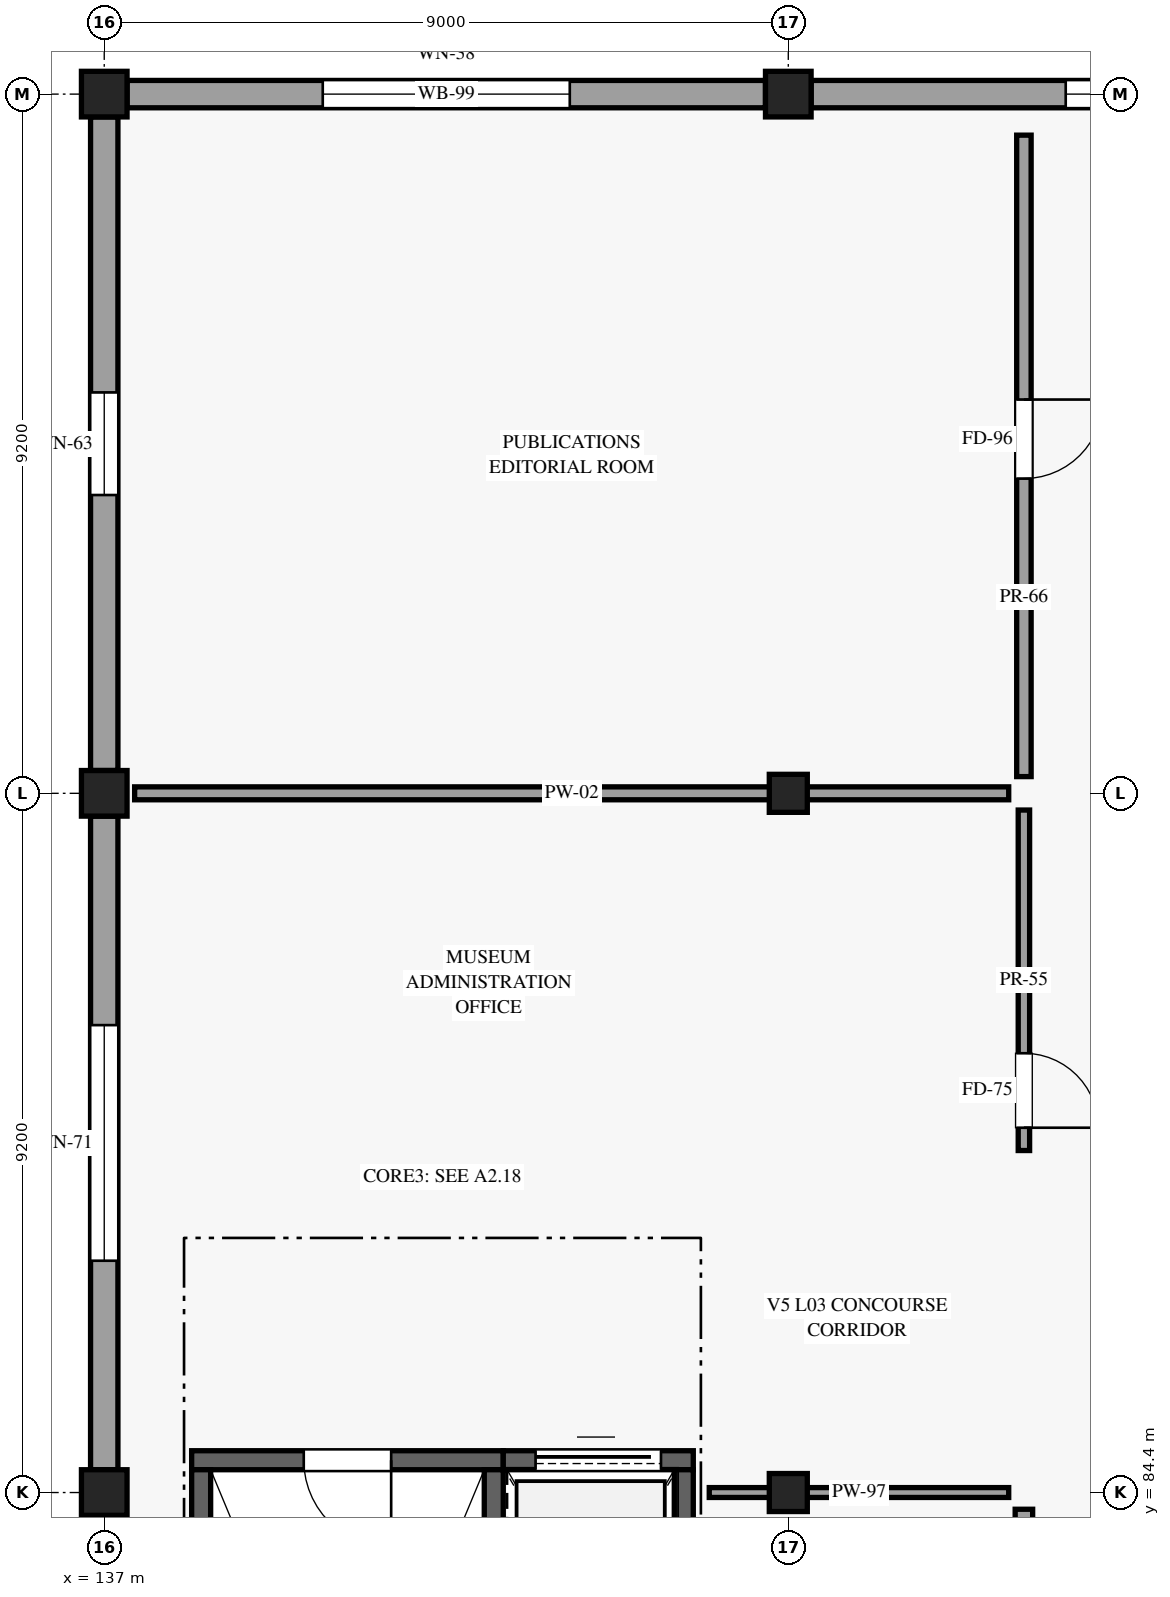
"""IFC4 building model, lengths in metres.
Left out: names, types, materials, properties, quantities, classifications, styles, units other than length and angle.
Written with IfcOpenShell. Run it as: python <this file> out.ifc"""

import sys

from ifc_helpers import new_model, si_unit, direction, frame, frame_2d, origin, origin_2d, place, context, subcontext, project, spatial, rectangle, extrude, element, fill, save


model = new_model("IFC4")
c1 = context("Model", 3, precision=1e-05, world=origin(), true_north=direction((0.0, 1.0)))
c2 = subcontext(c1, "Body", "Model", "MODEL_VIEW")
j1 = project(units=[si_unit("LENGTHUNIT", "METRE"), si_unit("PLANEANGLEUNIT", "RADIAN")], contexts=[c1])
p1 = place(None, origin())
s1 = spatial("IfcSite", under=j1, at=p1, CompositionType="ELEMENT")
p2 = place(p1, origin())
s2 = spatial("IfcBuilding", under=s1, at=p2, CompositionType="ELEMENT")
p3 = place(p2, frame((0.0, 0.0, 15.0)))
s3 = spatial("IfcBuildingStorey", under=s2, at=p3, CompositionType="ELEMENT", Elevation=15.0)
for number, where, z_axis, x_axis in (
    (1, (137.0, 84.4, 0.0), (0.0, 0.0, 1.0), (1.0, 0.0, 0.0)),
    (2, (137.0, 93.6, 0.0), (0.0, 0.0, 1.0), (1.0, 0.0, 0.0)),
    (3, (137.0, 102.8, 0.0), (0.0, 0.0, 1.0), (1.0, 0.0, 0.0)),
):
    element("IfcColumn", number, at=place(p3, frame(where, z_axis=z_axis, x_axis=x_axis)), inside=s3, PredefinedType="COLUMN", context=c2, shape_type="SweptSolid", body=[
        extrude(rectangle(XDim=0.6, YDim=0.6, at=origin_2d()), origin(), (0.0, 0.0, 1.0), 4.5),
    ])
for number, where, z_axis, x_axis in (
    (4, (146.0, 84.4, 0.0), (0.0, 0.0, 1.0), (1.0, 0.0, 0.0)),
    (5, (146.0, 93.6, 0.0), (0.0, 0.0, 1.0), (1.0, 0.0, 0.0)),
):
    element("IfcColumn", number, at=place(p3, frame(where, z_axis=z_axis, x_axis=x_axis)), inside=s3, PredefinedType="COLUMN", context=c2, shape_type="SweptSolid", body=[
        extrude(rectangle(XDim=0.5, YDim=0.5, at=origin_2d()), origin(), (0.0, 0.0, 1.0), 4.5),
    ])
p4 = place(p3, frame((146.0, 102.8, 0.0), z_axis=(0.0, 0.0, 1.0), x_axis=(1.0, 0.0, 0.0)))
e6 = element("IfcColumn", 6, at=p4, inside=s3, PredefinedType="COLUMN", context=c2, shape_type="SweptSolid", body=[
    extrude(rectangle(XDim=0.6, YDim=0.6, at=origin_2d()), origin(), (0.0, 0.0, 1.0), 4.5),
])
p5 = place(p3, frame((137.3, 102.8, 0.0), z_axis=(0.0, 0.0, 1.0), x_axis=(1.0, 0.0, 0.0)))
e7 = element("IfcWall", 7, at=p5, inside=s3, PredefinedType="STANDARD", context=c2, shape_type="SweptSolid", body=[
    extrude(rectangle(XDim=8.4, YDim=0.36, at=frame_2d((4.2, 0.0))), origin(), (0.0, 0.0, 1.0), 3.725),
])
p6 = place(p5, frame((2.575, 0.0, 0.85)))
e8 = element("IfcOpeningElement", 8, at=p6, cuts=e7, PredefinedType="OPENING", context=c2, shape_type="SweptSolid", body=[
    extrude(rectangle(XDim=3.25, YDim=2.6, at=frame_2d((1.625, 1.3))), frame((0.0, 0.19, 0.0), z_axis=(0.0, -1.0, 0.0), x_axis=(1.0, 0.0, 0.0)), (0.0, 0.0, 1.0), 0.38),
])
p7 = place(p3, frame((146.3, 102.8, 0.0), z_axis=(0.0, 0.0, 1.0), x_axis=(1.0, 0.0, 0.0)))
e9 = element("IfcWall", 9, at=p7, inside=s3, PredefinedType="STANDARD", context=c2, shape_type="SweptSolid", body=[
    extrude(rectangle(XDim=8.4, YDim=0.36, at=frame_2d((4.2, 0.0))), origin(), (0.0, 0.0, 1.0), 3.725),
])
p8 = place(p7, frame((3.35, 0.0, 0.85)))
e10 = element("IfcOpeningElement", 10, at=p8, cuts=e9, PredefinedType="OPENING", context=c2, shape_type="SweptSolid", body=[
    extrude(rectangle(XDim=1.7, YDim=2.3, at=frame_2d((0.85, 1.15))), frame((0.0, 0.19, 0.0), z_axis=(0.0, -1.0, 0.0), x_axis=(1.0, 0.0, 0.0)), (0.0, 0.0, 1.0), 0.38),
])
p9 = place(p3, frame((137.0, 75.5, 0.0), z_axis=(0.0, 0.0, 1.0), x_axis=(0.0, 1.0, 0.0)))
e11 = element("IfcWall", 11, at=p9, inside=s3, PredefinedType="STANDARD", context=c2, shape_type="SweptSolid", body=[
    extrude(rectangle(XDim=8.6, YDim=0.36, at=frame_2d((4.3, 0.0))), origin(), (0.0, 0.0, 1.0), 3.725),
])
p10 = place(p9, frame((2.95, 0.0, 0.85)))
e12 = element("IfcOpeningElement", 12, at=p10, cuts=e11, PredefinedType="OPENING", context=c2, shape_type="SweptSolid", body=[
    extrude(rectangle(XDim=2.7, YDim=2.2, at=frame_2d((1.35, 1.1))), frame((0.0, 0.19, 0.0), z_axis=(0.0, -1.0, 0.0), x_axis=(1.0, 0.0, 0.0)), (0.0, 0.0, 1.0), 0.38),
])
p11 = place(p3, frame((137.0, 84.7, 0.0), z_axis=(0.0, 0.0, 1.0), x_axis=(0.0, 1.0, 0.0)))
e13 = element("IfcWall", 13, at=p11, inside=s3, PredefinedType="STANDARD", context=c2, shape_type="SweptSolid", body=[
    extrude(rectangle(XDim=8.6, YDim=0.36, at=frame_2d((4.3, 0.0))), origin(), (0.0, 0.0, 1.0), 3.725),
])
p12 = place(p11, frame((2.75, 0.0, 0.85)))
e14 = element("IfcOpeningElement", 14, at=p12, cuts=e13, PredefinedType="OPENING", context=c2, shape_type="SweptSolid", body=[
    extrude(rectangle(XDim=3.1, YDim=2.3, at=frame_2d((1.55, 1.15))), frame((0.0, 0.19, 0.0), z_axis=(0.0, -1.0, 0.0), x_axis=(1.0, 0.0, 0.0)), (0.0, 0.0, 1.0), 0.38),
])
p13 = place(p3, frame((137.0, 93.9, 0.0), z_axis=(0.0, 0.0, 1.0), x_axis=(0.0, 1.0, 0.0)))
e15 = element("IfcWall", 15, at=p13, inside=s3, PredefinedType="STANDARD", context=c2, shape_type="SweptSolid", body=[
    extrude(rectangle(XDim=8.6, YDim=0.36, at=frame_2d((4.3, 0.0))), origin(), (0.0, 0.0, 1.0), 3.725),
])
p14 = place(p13, frame((3.625, 0.0, 0.85)))
e16 = element("IfcOpeningElement", 16, at=p14, cuts=e15, PredefinedType="OPENING", context=c2, shape_type="SweptSolid", body=[
    extrude(rectangle(XDim=1.35, YDim=1.75, at=frame_2d((0.675, 0.875))), frame((0.0, 0.19, 0.0), z_axis=(0.0, -1.0, 0.0), x_axis=(1.0, 0.0, 0.0)), (0.0, 0.0, 1.0), 0.38),
])
p15 = place(p3, frame((138.15, 84.825, 0.0), z_axis=(0.0, 0.0, 1.0), x_axis=(1.0, 0.0, 0.0)))
e17 = element("IfcWall", 17, at=p15, inside=s3, PredefinedType="SHEAR", context=c2, shape_type="SweptSolid", body=[
    extrude(rectangle(XDim=4.1, YDim=0.25, at=frame_2d((2.05, 0.0))), origin(), (0.0, 0.0, 1.0), 4.18),
])
p16 = place(p15, frame((2.625, 0.0, 0.0), z_axis=(0.0, 0.0, 1.0), x_axis=(-1.0, 0.0, 0.0)))
e18 = element("IfcOpeningElement", 18, at=p16, cuts=e17, PredefinedType="OPENING", context=c2, shape_type="SweptSolid", body=[
    extrude(rectangle(XDim=1.15, YDim=2.2, at=frame_2d((0.575, 1.1))), frame((0.0, 0.135, 0.0), z_axis=(0.0, -1.0, 0.0), x_axis=(1.0, 0.0, 0.0)), (0.0, 0.0, 1.0), 0.27),
])
for number, where, z_axis, x_axis in (
    (19, (138.275, 76.05, 0.0), (0.0, 0.0, 1.0), (0.0, 1.0, 0.0)),
    (20, (142.125, 76.05, 0.0), (0.0, 0.0, 1.0), (0.0, 1.0, 0.0)),
):
    element("IfcWall", number, at=place(p3, frame(where, z_axis=z_axis, x_axis=x_axis)), inside=s3, PredefinedType="SHEAR", context=c2, shape_type="SweptSolid", body=[
        extrude(rectangle(XDim=8.65, YDim=0.25, at=frame_2d((4.325, 0.0))), origin(), (0.0, 0.0, 1.0), 4.18),
    ])
p17 = place(p3, frame((142.25, 84.825, 0.0), z_axis=(0.0, 0.0, 1.0), x_axis=(1.0, 0.0, 0.0)))
e21 = element("IfcWall", 21, at=p17, inside=s3, PredefinedType="SHEAR", context=c2, shape_type="SweptSolid", body=[
    extrude(rectangle(XDim=2.5, YDim=0.25, at=frame_2d((1.25, 0.0))), origin(), (0.0, 0.0, 1.0), 4.18),
])
p18 = place(p17, frame((0.425, 0.0, 0.0)))
e22 = element("IfcOpeningElement", 22, at=p18, cuts=e21, PredefinedType="OPENING", context=c2, shape_type="SweptSolid", body=[
    extrude(rectangle(XDim=1.65, YDim=2.45, at=frame_2d((0.825, 1.225))), frame((0.0, 0.135, 0.0), z_axis=(0.0, -1.0, 0.0), x_axis=(1.0, 0.0, 0.0)), (0.0, 0.0, 1.0), 0.27),
])
p19 = place(p3, frame((144.625, 80.9, 0.0), z_axis=(0.0, 0.0, 1.0), x_axis=(0.0, 1.0, 0.0)))
e23 = element("IfcWall", 23, at=p19, inside=s3, PredefinedType="SHEAR", context=c2, shape_type="SweptSolid", body=[
    extrude(rectangle(XDim=3.8, YDim=0.25, at=frame_2d((1.9, 0.0))), origin(), (0.0, 0.0, 1.0), 4.18),
])
p20 = place(p3, frame((149.1, 75.42, 0.0), z_axis=(0.0, 0.0, 1.0), x_axis=(0.0, 1.0, 0.0)))
e24 = element("IfcWall", 24, at=p20, inside=s3, PredefinedType="PARTITIONING", context=c2, shape_type="SweptSolid", body=[
    extrude(rectangle(XDim=8.76, YDim=0.23, at=frame_2d((4.38, 0.0))), origin(), (0.0, 0.0, 1.0), 3.725),
])
p21 = place(p20, frame((4.8, 0.0, 0.0), z_axis=(0.0, 0.0, 1.0), x_axis=(-1.0, 0.0, 0.0)))
e25 = element("IfcOpeningElement", 25, at=p21, cuts=e24, PredefinedType="OPENING", context=c2, shape_type="SweptSolid", body=[
    extrude(rectangle(XDim=0.92, YDim=2.12, at=frame_2d((0.46, 1.06))), frame((0.0, 0.125, 0.0), z_axis=(0.0, -1.0, 0.0), x_axis=(1.0, 0.0, 0.0)), (0.0, 0.0, 1.0), 0.25),
])
p22 = place(p3, frame((144.96, 84.4, 0.0), z_axis=(0.0, 0.0, 1.0), x_axis=(1.0, 0.0, 0.0)))
e26 = element("IfcWall", 26, at=p22, inside=s3, PredefinedType="PARTITIONING", context=c2, shape_type="SweptSolid", body=[
    extrude(rectangle(XDim=3.94, YDim=0.13, at=frame_2d((1.97, 0.0))), origin(), (0.0, 0.0, 1.0), 3.725),
])
p23 = place(p3, frame((149.1, 88.9, 0.0), z_axis=(0.0, 0.0, 1.0), x_axis=(0.0, 1.0, 0.0)))
e27 = element("IfcWall", 27, at=p23, inside=s3, PredefinedType="PARTITIONING", context=c2, shape_type="SweptSolid", body=[
    extrude(rectangle(XDim=4.48, YDim=0.15, at=frame_2d((2.24, 0.0))), origin(), (0.0, 0.0, 1.0), 3.725),
])
p24 = place(p23, frame((1.28, 0.0, 0.0), z_axis=(0.0, 0.0, 1.0), x_axis=(-1.0, 0.0, 0.0)))
e28 = element("IfcOpeningElement", 28, at=p24, cuts=e27, PredefinedType="OPENING", context=c2, shape_type="SweptSolid", body=[
    extrude(rectangle(XDim=0.98, YDim=2.18, at=frame_2d((0.49, 1.09))), frame((0.0, 0.085, 0.0), z_axis=(0.0, -1.0, 0.0), x_axis=(1.0, 0.0, 0.0)), (0.0, 0.0, 1.0), 0.17),
])
p25 = place(p3, frame((137.4, 93.6, 0.0), z_axis=(0.0, 0.0, 1.0), x_axis=(1.0, 0.0, 0.0)))
e29 = element("IfcWall", 29, at=p25, inside=s3, PredefinedType="PARTITIONING", context=c2, shape_type="SweptSolid", body=[
    extrude(rectangle(XDim=11.5, YDim=0.17, at=frame_2d((5.75, 0.0))), origin(), (0.0, 0.0, 1.0), 3.725),
])
p26 = place(p3, frame((149.1, 93.82, 0.0), z_axis=(0.0, 0.0, 1.0), x_axis=(0.0, 1.0, 0.0)))
e30 = element("IfcWall", 30, at=p26, inside=s3, PredefinedType="PARTITIONING", context=c2, shape_type="SweptSolid", body=[
    extrude(rectangle(XDim=8.44, YDim=0.19, at=frame_2d((4.22, 0.0))), origin(), (0.0, 0.0, 1.0), 3.725),
])
p27 = place(p26, frame((4.961, 0.0, 0.0), z_axis=(0.0, 0.0, 1.0), x_axis=(-1.0, 0.0, 0.0)))
e31 = element("IfcOpeningElement", 31, at=p27, cuts=e30, PredefinedType="OPENING", context=c2, shape_type="SweptSolid", body=[
    extrude(rectangle(XDim=1.04, YDim=2.22, at=frame_2d((0.52, 1.11))), frame((0.0, 0.105, 0.0), z_axis=(0.0, -1.0, 0.0), x_axis=(1.0, 0.0, 0.0)), (0.0, 0.0, 1.0), 0.21),
])
p28 = place(p6, origin())
e32 = element("IfcWindow", 32, at=p28, inside=s3, PartitioningType="SINGLE_PANEL", PredefinedType="WINDOW", context=c2, shape_type="SweptSolid", body=[
    extrude(rectangle(XDim=3.25, YDim=2.6, at=frame_2d((1.625, 1.3))), frame((0.0, 0.03, 0.0), z_axis=(0.0, -1.0, 0.0), x_axis=(1.0, 0.0, 0.0)), (0.0, 0.0, 1.0), 0.06),
])
fill(e8, e32)
p29 = place(p8, origin())
e33 = element("IfcWindow", 33, at=p29, inside=s3, PartitioningType="SINGLE_PANEL", PredefinedType="WINDOW", context=c2, shape_type="SweptSolid", body=[
    extrude(rectangle(XDim=1.7, YDim=2.3, at=frame_2d((0.85, 1.15))), frame((0.0, 0.03, 0.0), z_axis=(0.0, -1.0, 0.0), x_axis=(1.0, 0.0, 0.0)), (0.0, 0.0, 1.0), 0.06),
])
fill(e10, e33)
p30 = place(p12, origin())
e34 = element("IfcWindow", 34, at=p30, inside=s3, PartitioningType="SINGLE_PANEL", PredefinedType="WINDOW", context=c2, shape_type="SweptSolid", body=[
    extrude(rectangle(XDim=3.1, YDim=2.3, at=frame_2d((1.55, 1.15))), frame((0.0, 0.03, 0.0), z_axis=(0.0, -1.0, 0.0), x_axis=(1.0, 0.0, 0.0)), (0.0, 0.0, 1.0), 0.06),
])
fill(e14, e34)
p31 = place(p14, origin())
e35 = element("IfcWindow", 35, at=p31, inside=s3, PartitioningType="SINGLE_PANEL", PredefinedType="WINDOW", context=c2, shape_type="SweptSolid", body=[
    extrude(rectangle(XDim=1.35, YDim=1.75, at=frame_2d((0.675, 0.875))), frame((0.0, 0.03, 0.0), z_axis=(0.0, -1.0, 0.0), x_axis=(1.0, 0.0, 0.0)), (0.0, 0.0, 1.0), 0.06),
])
fill(e16, e35)
p32 = place(p16, origin())
e36 = element("IfcDoor", 36, at=p32, inside=s3, OperationType="SINGLE_SWING_LEFT", PredefinedType="DOOR", context=c2, shape_type="SweptSolid", body=[
    extrude(rectangle(XDim=1.15, YDim=2.2, at=frame_2d((0.575, 1.1))), frame((0.0, 0.025, 0.0), z_axis=(0.0, -1.0, 0.0), x_axis=(1.0, 0.0, 0.0)), (0.0, 0.0, 1.0), 0.05),
])
fill(e18, e36)
p33 = place(p18, origin())
e37 = element("IfcDoor", 37, at=p33, inside=s3, OperationType="SLIDING_TO_LEFT", PredefinedType="DOOR", context=c2, shape_type="SweptSolid", body=[
    extrude(rectangle(XDim=1.65, YDim=2.45, at=frame_2d((0.825, 1.225))), frame((0.0, 0.025, 0.0), z_axis=(0.0, -1.0, 0.0), x_axis=(1.0, 0.0, 0.0)), (0.0, 0.0, 1.0), 0.05),
])
fill(e22, e37)
p34 = place(p24, origin())
e38 = element("IfcDoor", 38, at=p34, inside=s3, OperationType="SINGLE_SWING_RIGHT", PredefinedType="DOOR", context=c2, shape_type="SweptSolid", body=[
    extrude(rectangle(XDim=0.98, YDim=2.18, at=frame_2d((0.49, 1.09))), frame((0.0, 0.025, 0.0), z_axis=(0.0, -1.0, 0.0), x_axis=(1.0, 0.0, 0.0)), (0.0, 0.0, 1.0), 0.05),
])
fill(e28, e38)
p35 = place(p27, origin())
e39 = element("IfcDoor", 39, at=p35, inside=s3, OperationType="SINGLE_SWING_LEFT", PredefinedType="DOOR", context=c2, shape_type="SweptSolid", body=[
    extrude(rectangle(XDim=1.04, YDim=2.22, at=frame_2d((0.52, 1.11))), frame((0.0, 0.025, 0.0), z_axis=(0.0, -1.0, 0.0), x_axis=(1.0, 0.0, 0.0)), (0.0, 0.0, 1.0), 0.05),
])
fill(e31, e39)
save(model, sys.argv[1])
